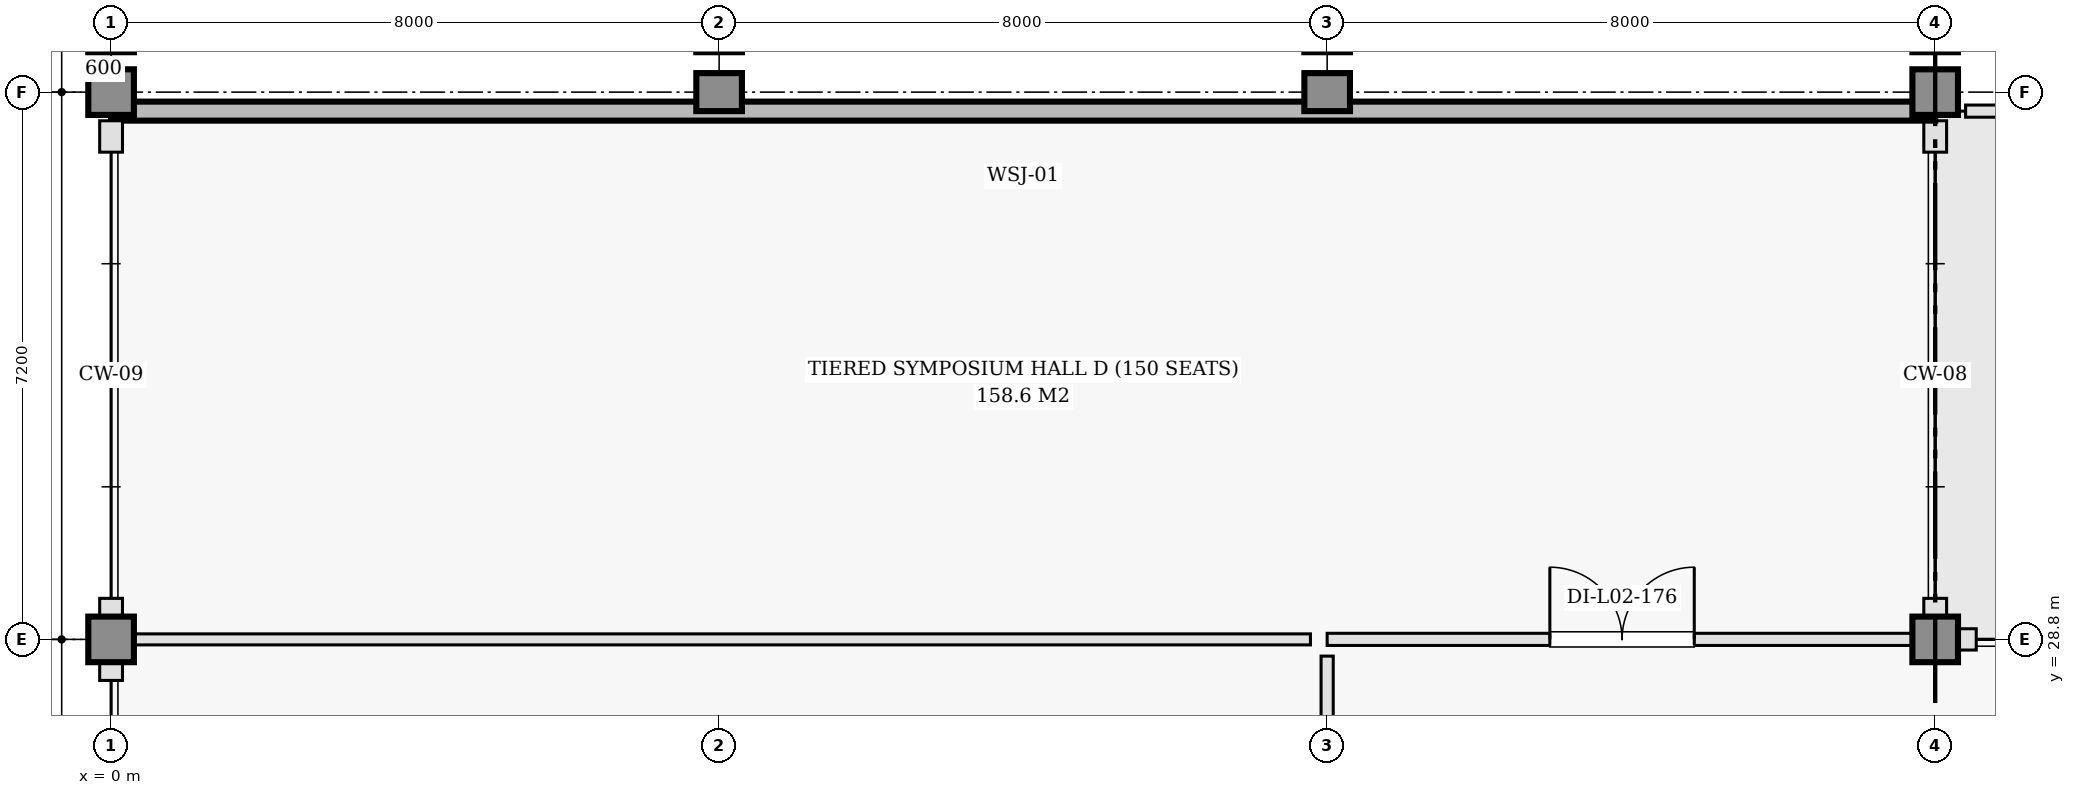
"""IFC4 building model, lengths in metres.
Left out: names, types, materials, properties, quantities, classifications, styles, units other than length and angle.
Written with IfcOpenShell. Run it as: python <this file> out.ifc"""

import sys

from ifc_helpers import new_model, si_unit, direction, frame, frame_2d, origin, origin_2d, place, context, subcontext, project, spatial, rectangle, extrude, element, fill, save


model = new_model("IFC4")
c1 = context("Model", 3, precision=1e-05, world=origin(), true_north=direction((0.0, 1.0)))
c2 = subcontext(c1, "Body", "Model", "MODEL_VIEW")
j1 = project(units=[si_unit("LENGTHUNIT", "METRE"), si_unit("PLANEANGLEUNIT", "RADIAN")], contexts=[c1])
p1 = place(None, origin())
s1 = spatial("IfcSite", under=j1, at=p1, CompositionType="ELEMENT")
p2 = place(p1, origin())
s2 = spatial("IfcBuilding", under=s1, at=p2, CompositionType="ELEMENT")
p3 = place(p2, frame((0.0, 0.0, 9.6)))
s3 = spatial("IfcBuildingStorey", under=s2, at=p3, CompositionType="ELEMENT", Elevation=9.6)
for number, where, z_axis, x_axis in (
    (1, (0.0, 28.8, 0.0), (0.0, 0.0, 1.0), (1.0, 0.0, 0.0)),
    (2, (0.0, 36.0, 0.0), (0.0, 0.0, 1.0), (1.0, 0.0, 0.0)),
):
    element("IfcColumn", number, at=place(p3, frame(where, z_axis=z_axis, x_axis=x_axis)), inside=s3, PredefinedType="COLUMN", context=c2, shape_type="SweptSolid", body=[
        extrude(rectangle(XDim=0.6, YDim=0.6, at=origin_2d()), origin(), (0.0, 0.0, 1.0), 4.2),
    ])
for number, where, z_axis, x_axis in (
    (3, (8.0, 36.0, 0.0), (0.0, 0.0, 1.0), (1.0, 0.0, 0.0)),
    (4, (16.0, 36.0, 0.0), (0.0, 0.0, 1.0), (1.0, 0.0, 0.0)),
):
    element("IfcColumn", number, at=place(p3, frame(where, z_axis=z_axis, x_axis=x_axis)), inside=s3, PredefinedType="COLUMN", context=c2, shape_type="SweptSolid", body=[
        extrude(rectangle(XDim=0.5, YDim=0.5, at=origin_2d()), origin(), (0.0, 0.0, 1.0), 4.2),
    ])
for number, where, z_axis, x_axis in (
    (5, (24.0, 28.8, 0.0), (0.0, 0.0, 1.0), (1.0, 0.0, 0.0)),
    (6, (24.0, 36.0, 0.0), (0.0, 0.0, 1.0), (1.0, 0.0, 0.0)),
):
    element("IfcColumn", number, at=place(p3, frame(where, z_axis=z_axis, x_axis=x_axis)), inside=s3, PredefinedType="COLUMN", context=c2, shape_type="SweptSolid", body=[
        extrude(rectangle(XDim=0.6, YDim=0.6, at=origin_2d()), origin(), (0.0, 0.0, 1.0), 4.2),
    ])
for number, where, z_axis, x_axis in (
    (7, (0.0, 36.75, 0.0), (0.0, 0.0, 1.0), (1.0, 0.0, 0.0)),
    (8, (8.0, 36.75, 0.0), (0.0, 0.0, 1.0), (1.0, 0.0, 0.0)),
    (9, (16.0, 36.75, 0.0), (0.0, 0.0, 1.0), (1.0, 0.0, 0.0)),
    (10, (24.0, 36.75, 0.0), (0.0, 0.0, 1.0), (1.0, 0.0, 0.0)),
):
    element("IfcColumn", number, at=place(p3, frame(where, z_axis=z_axis, x_axis=x_axis)), inside=s3, PredefinedType="COLUMN", context=c2, shape_type="SweptSolid", body=[
        extrude(rectangle(XDim=0.45, YDim=0.45, at=origin_2d()), origin(), (0.0, 0.0, 1.0), 4.2),
    ])
p4 = place(p3, frame((24.54, 28.8, 0.0), z_axis=(0.0, 0.0, 1.0), x_axis=(-1.0, 0.0, 0.0)))
e11 = element("IfcWall", 11, at=p4, inside=s3, PredefinedType="SOLIDWALL", context=c2, shape_type="SweptSolid", body=[
    extrude(rectangle(XDim=0.54, YDim=0.28, at=frame_2d((0.27, 0.0))), origin(), (0.0, 0.0, 1.0), 3.385),
])
p5 = place(p3, frame((24.0, 28.942, 0.0), z_axis=(0.0, 0.0, 1.0), x_axis=(0.0, 1.0, 0.0)))
e12 = element("IfcWall", 12, at=p5, inside=s3, PredefinedType="SOLIDWALL", context=c2, shape_type="SweptSolid", body=[
    extrude(rectangle(XDim=0.398, YDim=0.3, at=frame_2d((0.199, 0.0))), origin(), (0.0, 0.0, 1.0), 3.385),
])
p6 = place(p3, frame((24.0, 35.21, 0.0), z_axis=(0.0, 0.0, 1.0), x_axis=(0.0, 1.0, 0.0)))
e13 = element("IfcWall", 13, at=p6, inside=s3, PredefinedType="SOLIDWALL", context=c2, shape_type="SweptSolid", body=[
    extrude(rectangle(XDim=0.413, YDim=0.3, at=frame_2d((0.207, 0.0))), origin(), (0.0, 0.0, 1.0), 3.385),
])
p7 = place(p3, frame((24.0, 35.75, 0.0), z_axis=(0.0, 0.0, 1.0), x_axis=(-1.0, 0.0, 0.0)))
e14 = element("IfcWall", 14, at=p7, inside=s3, PredefinedType="SHEAR", context=c2, shape_type="SweptSolid", body=[
    extrude(rectangle(XDim=24.0, YDim=0.25, at=frame_2d((12.0, 0.0))), origin(), (0.0, 0.0, 1.0), 4.2),
])
p8 = place(p3, frame((0.0, 35.623, 0.0), z_axis=(0.0, 0.0, 1.0), x_axis=(0.0, -1.0, 0.0)))
e15 = element("IfcWall", 15, at=p8, inside=s3, PredefinedType="SOLIDWALL", context=c2, shape_type="SweptSolid", body=[
    extrude(rectangle(XDim=0.413, YDim=0.3, at=frame_2d((0.207, 0.0))), origin(), (0.0, 0.0, 1.0), 3.385),
])
for number, where, z_axis, x_axis in (
    (16, (0.0, 29.34, 0.0), (0.0, 0.0, 1.0), (0.0, -1.0, 0.0)),
    (17, (0.0, 28.8, 0.0), (0.0, 0.0, 1.0), (0.0, -1.0, 0.0)),
):
    element("IfcWall", number, at=place(p3, frame(where, z_axis=z_axis, x_axis=x_axis)), inside=s3, PredefinedType="SOLIDWALL", context=c2, shape_type="SweptSolid", body=[
        extrude(rectangle(XDim=0.54, YDim=0.3, at=frame_2d((0.27, 0.0))), origin(), (0.0, 0.0, 1.0), 3.385),
    ])
p9 = place(p3, frame((47.75, 35.75, 0.3), z_axis=(0.0, 0.0, 1.0), x_axis=(-1.0, 0.0, 0.0)))
e18 = element("IfcWall", 18, at=p9, inside=s3, PredefinedType="PARAPET", context=c2, shape_type="SweptSolid", body=[
    extrude(rectangle(XDim=23.35, YDim=0.16, at=frame_2d((11.675, 0.0))), origin(), (0.0, 0.0, 1.0), 1.1),
])
p10 = place(p3, frame((16.0, 28.8, 0.0), z_axis=(0.0, 0.0, 1.0), x_axis=(1.0, 0.0, 0.0)))
e19 = element("IfcWall", 19, at=p10, inside=s3, PredefinedType="PARTITIONING", context=c2, shape_type="SweptSolid", body=[
    extrude(rectangle(XDim=7.76, YDim=0.16, at=frame_2d((3.88, 0.0))), origin(), (0.0, 0.0, 1.0), 3.94),
])
p11 = place(p10, frame((2.93, 0.0, 0.0)))
e20 = element("IfcOpeningElement", 20, at=p11, cuts=e19, PredefinedType="OPENING", context=c2, shape_type="SweptSolid", body=[
    extrude(rectangle(XDim=1.9, YDim=2.25, at=frame_2d((0.95, 1.125))), frame((0.0, 0.09, 0.0), z_axis=(0.0, -1.0, 0.0), x_axis=(1.0, 0.0, 0.0)), (0.0, 0.0, 1.0), 0.18),
])
p12 = place(p3, frame((0.055, 28.8, 0.0), z_axis=(0.0, 0.0, 1.0), x_axis=(1.0, 0.0, 0.0)))
e21 = element("IfcWall", 21, at=p12, inside=s3, PredefinedType="PARTITIONING", context=c2, shape_type="SweptSolid", body=[
    extrude(rectangle(XDim=15.725, YDim=0.145, at=frame_2d((7.863, 0.0))), origin(), (0.0, 0.0, 1.0), 3.94),
])
p13 = place(p3, frame((16.0, 26.02, 0.0), z_axis=(0.0, 0.0, 1.0), x_axis=(0.0, 1.0, 0.0)))
e22 = element("IfcWall", 22, at=p13, inside=s3, PredefinedType="PARTITIONING", context=c2, shape_type="SweptSolid", body=[
    extrude(rectangle(XDim=2.56, YDim=0.16, at=frame_2d((1.28, 0.0))), origin(), (0.0, 0.0, 1.0), 3.94),
])
p14 = place(p11, origin())
e23 = element("IfcDoor", 23, at=p14, inside=s3, OperationType="DOUBLE_DOOR_SINGLE_SWING", PredefinedType="DOOR", context=c2, shape_type="SweptSolid", body=[
    extrude(rectangle(XDim=1.9, YDim=2.25, at=frame_2d((0.95, 1.125))), frame((0.0, 0.025, 0.0), z_axis=(0.0, -1.0, 0.0), x_axis=(1.0, 0.0, 0.0)), (0.0, 0.0, 1.0), 0.05),
])
fill(e20, e23)
save(model, sys.argv[1])
